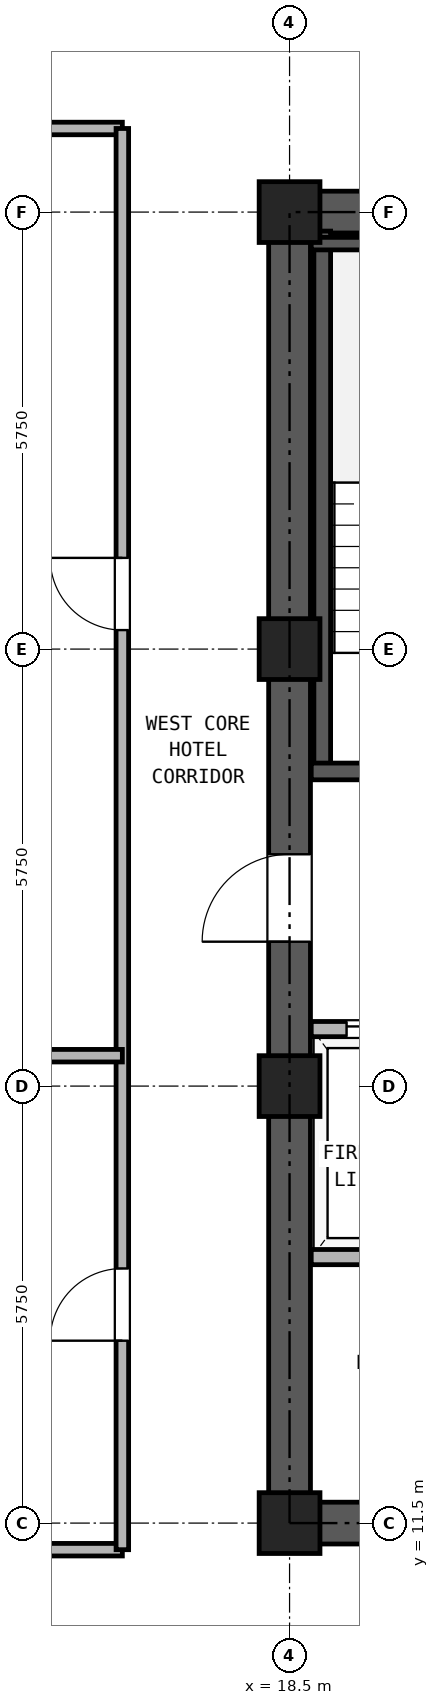
"""IFC4 building model, lengths in metres.
Left out: names, types, materials, properties, quantities, classifications, styles, units other than length and angle.
Written with IfcOpenShell. Run it as: python <this file> out.ifc"""

import sys

from ifc_helpers import new_model, si_unit, direction, frame, frame_2d, origin, origin_2d, place, context, subcontext, project, spatial, rectangle, hollow_rectangle, extrude, source, transform, mapped, element, fill, save


model = new_model("IFC4")
c1 = context("Model", 3, precision=1e-05, world=origin(), true_north=direction((0.0, 1.0)))
c2 = subcontext(c1, "Body", "Model", "MODEL_VIEW")
j1 = project(units=[si_unit("LENGTHUNIT", "METRE"), si_unit("PLANEANGLEUNIT", "RADIAN")], contexts=[c1])
p1 = place(None, origin())
s1 = spatial("IfcSite", under=j1, at=p1, CompositionType="ELEMENT")
p2 = place(p1, origin())
s2 = spatial("IfcBuilding", under=s1, at=p2, CompositionType="ELEMENT")
p3 = place(p2, frame((0.0, 0.0, 134.3)))
s3 = spatial("IfcBuildingStorey", under=s2, at=p3, CompositionType="ELEMENT", Elevation=134.3)
m1 = source(origin(), c2, "Body", "SweptSolid", [
    extrude(hollow_rectangle(XDim=0.8, YDim=0.8, WallThickness=0.045, at=origin_2d()), origin(), (0.0, 0.0, 1.0), 2.95),
])
for number, where, z_axis, x_axis in (
    (1, (18.5, 11.5, 0.0), (0.0, 0.0, 1.0), (1.0, 0.0, 0.0)),
    (2, (18.5, 17.25, 0.0), (0.0, 0.0, 1.0), (1.0, 0.0, 0.0)),
    (3, (18.5, 23.0, 0.0), (0.0, 0.0, 1.0), (1.0, 0.0, 0.0)),
    (4, (18.5, 28.75, 0.0), (0.0, 0.0, 1.0), (1.0, 0.0, 0.0)),
):
    element("IfcColumn", number, at=place(p3, frame(where, z_axis=z_axis, x_axis=x_axis)), inside=s3, PredefinedType="COLUMN", context=c2, shape_type="MappedRepresentation", body=[
        mapped(m1, transform((0.0, 0.0, 0.0), x_axis=(1.0, 0.0, 0.0), y_axis=(0.0, 1.0, 0.0), z_axis=(0.0, 0.0, 1.0), scale=1.0)),
    ])
p4 = place(p3, frame((18.225, 11.5, 0.0), z_axis=(0.0, 0.0, 1.0), x_axis=(1.0, 0.0, 0.0)))
e5 = element("IfcWall", 5, at=p4, inside=s3, PredefinedType="SHEAR", context=c2, shape_type="SweptSolid", body=[
    extrude(rectangle(XDim=10.55, YDim=0.55, at=frame_2d((5.275, 0.0))), origin(), (0.0, 0.0, 1.0), 2.95),
])
p5 = place(p4, frame((2.375, 0.0, 0.0)))
e6 = element("IfcOpeningElement", 6, at=p5, cuts=e5, PredefinedType="OPENING", context=c2, shape_type="SweptSolid", body=[
    extrude(rectangle(XDim=0.95, YDim=2.15, at=frame_2d((0.475, 1.075))), frame((0.0, 0.285, 0.0), z_axis=(0.0, -1.0, 0.0), x_axis=(1.0, 0.0, 0.0)), (0.0, 0.0, 1.0), 0.57),
])
p6 = place(p4, frame((5.875, 0.0, 0.0)))
e7 = element("IfcOpeningElement", 7, at=p6, cuts=e5, PredefinedType="OPENING", context=c2, shape_type="SweptSolid", body=[
    extrude(rectangle(XDim=1.1, YDim=2.25, at=frame_2d((0.55, 1.125))), frame((0.0, 0.285, 0.0), z_axis=(0.0, -1.0, 0.0), x_axis=(1.0, 0.0, 0.0)), (0.0, 0.0, 1.0), 0.57),
])
p7 = place(p4, frame((8.275, 0.0, 0.0)))
e8 = element("IfcOpeningElement", 8, at=p7, cuts=e5, PredefinedType="OPENING", context=c2, shape_type="SweptSolid", body=[
    extrude(rectangle(XDim=1.1, YDim=2.25, at=frame_2d((0.55, 1.125))), frame((0.0, 0.285, 0.0), z_axis=(0.0, -1.0, 0.0), x_axis=(1.0, 0.0, 0.0)), (0.0, 0.0, 1.0), 0.57),
])
p8 = place(p3, frame((18.225, 28.75, 0.0), z_axis=(0.0, 0.0, 1.0), x_axis=(1.0, 0.0, 0.0)))
e9 = element("IfcWall", 9, at=p8, inside=s3, PredefinedType="SHEAR", context=c2, shape_type="SweptSolid", body=[
    extrude(rectangle(XDim=10.55, YDim=0.55, at=frame_2d((5.275, 0.0))), origin(), (0.0, 0.0, 1.0), 2.95),
])
p9 = place(p8, frame((4.155, 0.0, 0.0)))
e10 = element("IfcOpeningElement", 10, at=p9, cuts=e9, PredefinedType="OPENING", context=c2, shape_type="SweptSolid", body=[
    extrude(rectangle(XDim=0.9, YDim=2.05, at=frame_2d((0.45, 1.025))), frame((0.0, 0.285, 0.0), z_axis=(0.0, -1.0, 0.0), x_axis=(1.0, 0.0, 0.0)), (0.0, 0.0, 1.0), 0.57),
])
p10 = place(p8, frame((5.695, 0.0, 0.0)))
e11 = element("IfcOpeningElement", 11, at=p10, cuts=e9, PredefinedType="OPENING", context=c2, shape_type="SweptSolid", body=[
    extrude(rectangle(XDim=0.9, YDim=2.05, at=frame_2d((0.45, 1.025))), frame((0.0, 0.285, 0.0), z_axis=(0.0, -1.0, 0.0), x_axis=(1.0, 0.0, 0.0)), (0.0, 0.0, 1.0), 0.57),
])
p11 = place(p3, frame((18.5, 11.775, 0.0), z_axis=(0.0, 0.0, 1.0), x_axis=(0.0, 1.0, 0.0)))
e12 = element("IfcWall", 12, at=p11, inside=s3, PredefinedType="SHEAR", context=c2, shape_type="SweptSolid", body=[
    extrude(rectangle(XDim=16.7, YDim=0.55, at=frame_2d((8.35, 0.0))), origin(), (0.0, 0.0, 1.0), 2.95),
])
p12 = place(p11, frame((7.375, 0.0, 0.0)))
e13 = element("IfcOpeningElement", 13, at=p12, cuts=e12, PredefinedType="OPENING", context=c2, shape_type="SweptSolid", body=[
    extrude(rectangle(XDim=1.15, YDim=2.2, at=frame_2d((0.575, 1.1))), frame((0.0, 0.285, 0.0), z_axis=(0.0, -1.0, 0.0), x_axis=(1.0, 0.0, 0.0)), (0.0, 0.0, 1.0), 0.57),
])
p13 = place(p3, frame((18.93, 21.39, 0.0), z_axis=(0.0, 0.0, 1.0), x_axis=(0.0, 1.0, 0.0)))
e14 = element("IfcWall", 14, at=p13, inside=s3, PredefinedType="SOLIDWALL", context=c2, shape_type="SweptSolid", body=[
    extrude(rectangle(XDim=7.11, YDim=0.22, at=frame_2d((3.555, 0.0))), origin(), (0.0, 0.0, 1.0), 2.95),
])
p14 = place(p3, frame((18.785, 28.335, 0.0), z_axis=(0.0, 0.0, 1.0), x_axis=(1.0, 0.0, 0.0)))
e15 = element("IfcWall", 15, at=p14, inside=s3, PredefinedType="PARTITIONING", context=c2, shape_type="SweptSolid", body=[
    extrude(rectangle(XDim=3.325, YDim=0.165, at=frame_2d((1.663, 0.0))), origin(), (0.0, 0.0, 1.0), 2.95),
])
p15 = place(p3, frame((18.785, 21.39, 0.0), z_axis=(0.0, 0.0, 1.0), x_axis=(1.0, 0.0, 0.0)))
e16 = element("IfcWall", 16, at=p15, inside=s3, PredefinedType="SOLIDWALL", context=c2, shape_type="SweptSolid", body=[
    extrude(rectangle(XDim=6.345, YDim=0.22, at=frame_2d((3.172, 0.0))), origin(), (0.0, 0.0, 1.0), 2.95),
])
p16 = place(p15, frame((1.065, 0.0, 0.0)))
e17 = element("IfcOpeningElement", 17, at=p16, cuts=e16, PredefinedType="OPENING", context=c2, shape_type="SweptSolid", body=[
    extrude(rectangle(XDim=1.15, YDim=2.2, at=frame_2d((0.575, 1.1))), frame((0.0, 0.12, 0.0), z_axis=(0.0, -1.0, 0.0), x_axis=(1.0, 0.0, 0.0)), (0.0, 0.0, 1.0), 0.24),
])
p17 = place(p15, frame((4.795, 0.0, 0.0)))
e18 = element("IfcOpeningElement", 18, at=p17, cuts=e16, PredefinedType="OPENING", context=c2, shape_type="SweptSolid", body=[
    extrude(rectangle(XDim=1.1, YDim=2.25, at=frame_2d((0.55, 1.125))), frame((0.0, 0.12, 0.0), z_axis=(0.0, -1.0, 0.0), x_axis=(1.0, 0.0, 0.0)), (0.0, 0.0, 1.0), 0.24),
])
p18 = place(p3, frame((18.785, 18.0, 0.0), z_axis=(0.0, 0.0, 1.0), x_axis=(1.0, 0.0, 0.0)))
e19 = element("IfcWall", 19, at=p18, inside=s3, PredefinedType="PARTITIONING", context=c2, shape_type="SweptSolid", body=[
    extrude(rectangle(XDim=9.43, YDim=0.2, at=frame_2d((4.715, 0.0))), origin(), (0.0, 0.0, 1.0), 2.95),
])
p19 = place(p18, frame((0.465, 0.0, 0.0)))
e20 = element("IfcOpeningElement", 20, at=p19, cuts=e19, PredefinedType="OPENING", context=c2, shape_type="SweptSolid", body=[
    extrude(rectangle(XDim=1.3, YDim=2.3, at=frame_2d((0.65, 1.15))), frame((0.0, 0.11, 0.0), z_axis=(0.0, -1.0, 0.0), x_axis=(1.0, 0.0, 0.0)), (0.0, 0.0, 1.0), 0.22),
])
p20 = place(p18, frame((2.565, 0.0, 0.0)))
e21 = element("IfcOpeningElement", 21, at=p20, cuts=e19, PredefinedType="OPENING", context=c2, shape_type="SweptSolid", body=[
    extrude(rectangle(XDim=1.3, YDim=2.3, at=frame_2d((0.65, 1.15))), frame((0.0, 0.11, 0.0), z_axis=(0.0, -1.0, 0.0), x_axis=(1.0, 0.0, 0.0)), (0.0, 0.0, 1.0), 0.22),
])
p21 = place(p18, frame((4.985, 0.0, 0.0)))
e22 = element("IfcOpeningElement", 22, at=p21, cuts=e19, PredefinedType="OPENING", context=c2, shape_type="SweptSolid", body=[
    extrude(rectangle(XDim=0.9, YDim=2.05, at=frame_2d((0.45, 1.025))), frame((0.0, 0.11, 0.0), z_axis=(0.0, -1.0, 0.0), x_axis=(1.0, 0.0, 0.0)), (0.0, 0.0, 1.0), 0.22),
])
p22 = place(p18, frame((8.115, 0.0, 0.0)))
e23 = element("IfcOpeningElement", 23, at=p22, cuts=e19, PredefinedType="OPENING", context=c2, shape_type="SweptSolid", body=[
    extrude(rectangle(XDim=0.9, YDim=2.05, at=frame_2d((0.45, 1.025))), frame((0.0, 0.11, 0.0), z_axis=(0.0, -1.0, 0.0), x_axis=(1.0, 0.0, 0.0)), (0.0, 0.0, 1.0), 0.22),
])
p23 = place(p3, frame((18.785, 15.0, 0.0), z_axis=(0.0, 0.0, 1.0), x_axis=(1.0, 0.0, 0.0)))
e24 = element("IfcWall", 24, at=p23, inside=s3, PredefinedType="PARTITIONING", context=c2, shape_type="SweptSolid", body=[
    extrude(rectangle(XDim=9.43, YDim=0.2, at=frame_2d((4.715, 0.0))), origin(), (0.0, 0.0, 1.0), 2.95),
])
for number, where, z_axis, x_axis in (
    (25, (6.6, 11.15, 0.0), (0.0, 0.0, 1.0), (1.0, 0.0, 0.0)),
    (26, (6.6, 29.85, 0.0), (0.0, 0.0, 1.0), (1.0, 0.0, 0.0)),
):
    element("IfcWall", number, at=place(p3, frame(where, z_axis=z_axis, x_axis=x_axis)), inside=s3, PredefinedType="PARTITIONING", context=c2, shape_type="SweptSolid", body=[
        extrude(rectangle(XDim=9.7, YDim=0.165, at=frame_2d((4.85, 0.0))), origin(), (0.0, 0.0, 1.0), 2.95),
    ])
p24 = place(p3, frame((16.3, 11.15, 0.0), z_axis=(0.0, 0.0, 1.0), x_axis=(0.0, 1.0, 0.0)))
e27 = element("IfcWall", 27, at=p24, inside=s3, PredefinedType="PARTITIONING", context=c2, shape_type="SweptSolid", body=[
    extrude(rectangle(XDim=18.7, YDim=0.165, at=frame_2d((9.35, 0.0))), origin(), (0.0, 0.0, 1.0), 2.95),
])
p25 = place(p24, frame((2.75, 0.0, 0.0)))
e28 = element("IfcOpeningElement", 28, at=p25, cuts=e27, PredefinedType="OPENING", context=c2, shape_type="SweptSolid", body=[
    extrude(rectangle(XDim=0.95, YDim=2.15, at=frame_2d((0.475, 1.075))), frame((0.0, 0.093, 0.0), z_axis=(0.0, -1.0, 0.0), x_axis=(1.0, 0.0, 0.0)), (0.0, 0.0, 1.0), 0.185),
])
p26 = place(p24, frame((12.1, 0.0, 0.0)))
e29 = element("IfcOpeningElement", 29, at=p26, cuts=e27, PredefinedType="OPENING", context=c2, shape_type="SweptSolid", body=[
    extrude(rectangle(XDim=0.95, YDim=2.15, at=frame_2d((0.475, 1.075))), frame((0.0, 0.093, 0.0), z_axis=(0.0, -1.0, 0.0), x_axis=(1.0, 0.0, 0.0)), (0.0, 0.0, 1.0), 0.185),
])
p27 = place(p3, frame((0.16, 17.65, 0.0), z_axis=(0.0, 0.0, 1.0), x_axis=(1.0, 0.0, 0.0)))
e30 = element("IfcWall", 30, at=p27, inside=s3, PredefinedType="PARTITIONING", context=c2, shape_type="SweptSolid", body=[
    extrude(rectangle(XDim=16.14, YDim=0.165, at=frame_2d((8.07, 0.0))), origin(), (0.0, 0.0, 1.0), 2.95),
])
p28 = place(p19, origin())
e31 = element("IfcDoor", 31, at=p28, inside=s3, OperationType="DOUBLE_DOOR_SLIDING", PredefinedType="DOOR", context=c2, shape_type="SweptSolid", body=[
    extrude(rectangle(XDim=1.3, YDim=2.3, at=frame_2d((0.65, 1.15))), frame((0.0, 0.025, 0.0), z_axis=(0.0, -1.0, 0.0), x_axis=(1.0, 0.0, 0.0)), (0.0, 0.0, 1.0), 0.05),
])
fill(e20, e31)
p29 = place(p12, frame((1.15, 0.0, 0.0), z_axis=(0.0, 0.0, 1.0), x_axis=(-1.0, 0.0, 0.0)))
e32 = element("IfcDoor", 32, at=p29, inside=s3, OperationType="SINGLE_SWING_LEFT", PredefinedType="DOOR", context=c2, shape_type="SweptSolid", body=[
    extrude(rectangle(XDim=1.15, YDim=2.2, at=frame_2d((0.575, 1.1))), frame((0.0, 0.025, 0.0), z_axis=(0.0, -1.0, 0.0), x_axis=(1.0, 0.0, 0.0)), (0.0, 0.0, 1.0), 0.05),
])
fill(e13, e32)
p30 = place(p25, frame((0.95, 0.0, 0.0), z_axis=(0.0, 0.0, 1.0), x_axis=(-1.0, 0.0, 0.0)))
e33 = element("IfcDoor", 33, at=p30, inside=s3, OperationType="SINGLE_SWING_LEFT", PredefinedType="DOOR", context=c2, shape_type="SweptSolid", body=[
    extrude(rectangle(XDim=0.95, YDim=2.15, at=frame_2d((0.475, 1.075))), frame((0.0, 0.025, 0.0), z_axis=(0.0, -1.0, 0.0), x_axis=(1.0, 0.0, 0.0)), (0.0, 0.0, 1.0), 0.05),
])
fill(e28, e33)
p31 = place(p26, frame((0.95, 0.0, 0.0), z_axis=(0.0, 0.0, 1.0), x_axis=(-1.0, 0.0, 0.0)))
e34 = element("IfcDoor", 34, at=p31, inside=s3, OperationType="SINGLE_SWING_RIGHT", PredefinedType="DOOR", context=c2, shape_type="SweptSolid", body=[
    extrude(rectangle(XDim=0.95, YDim=2.15, at=frame_2d((0.475, 1.075))), frame((0.0, 0.025, 0.0), z_axis=(0.0, -1.0, 0.0), x_axis=(1.0, 0.0, 0.0)), (0.0, 0.0, 1.0), 0.05),
])
fill(e29, e34)
save(model, sys.argv[1])
